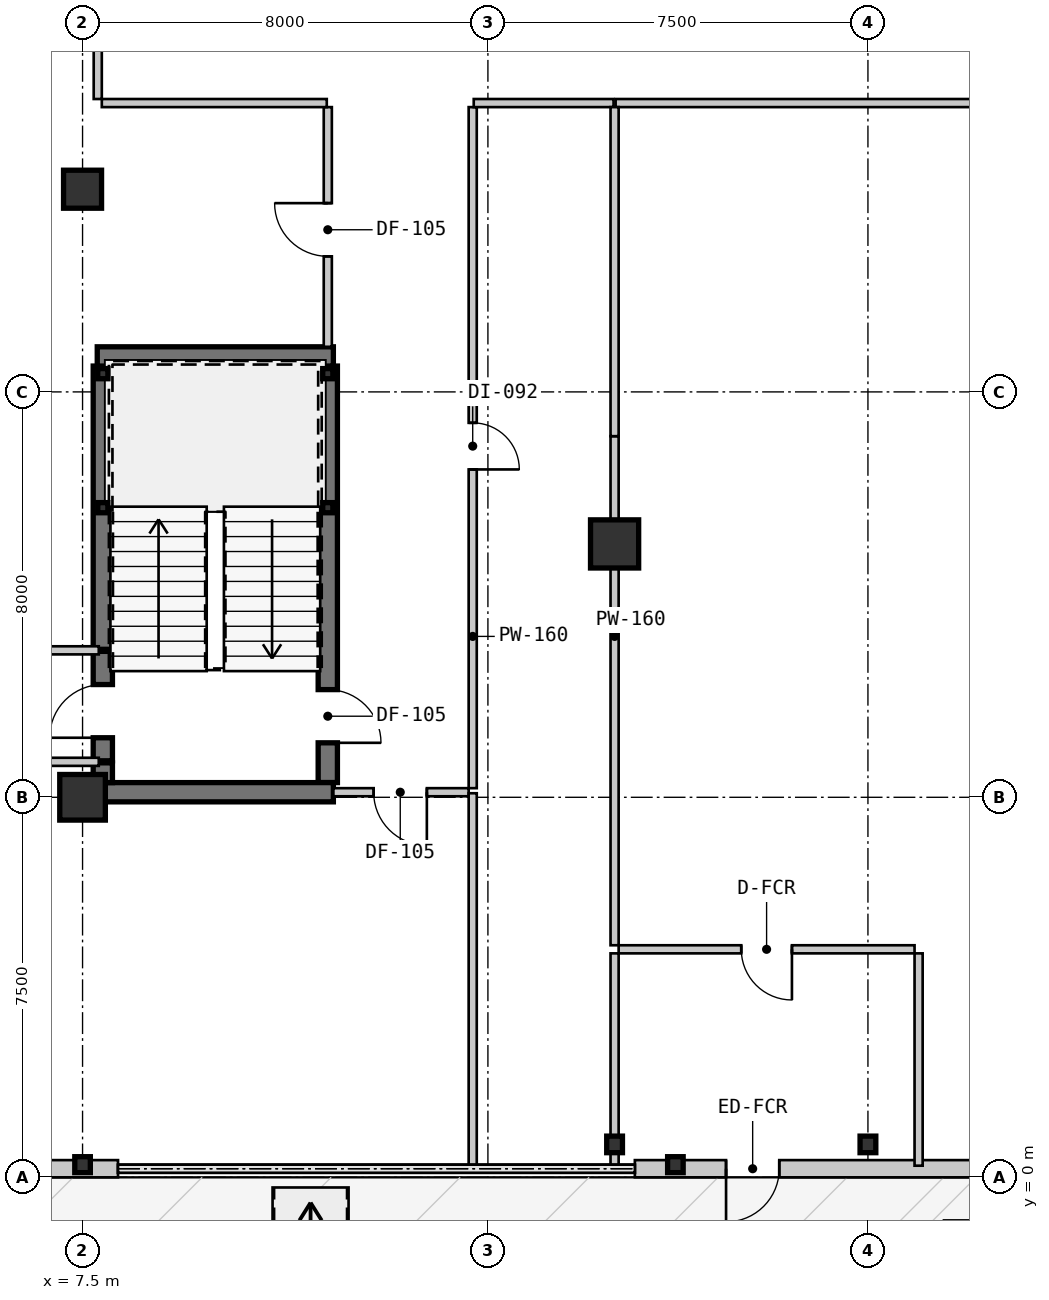
"""IFC4 building model, lengths in metres.
Left out: names, types, materials, properties, quantities, classifications, styles, units other than length and angle.
Written with IfcOpenShell. Run it as: python <this file> out.ifc"""

import sys

from ifc_helpers import new_model, si_unit, direction, frame, frame_2d, origin, origin_2d, place, context, subcontext, project, spatial, rectangle, hollow_rectangle, circle, i_section, extrude, source, transform, mapped, element, fill, save


model = new_model("IFC4")
c1 = context("Model", 3, precision=1e-05, world=origin(), true_north=direction((0.0, 1.0)))
c2 = subcontext(c1, "Body", "Model", "MODEL_VIEW")
j1 = project(units=[si_unit("LENGTHUNIT", "METRE"), si_unit("PLANEANGLEUNIT", "RADIAN")], contexts=[c1])
p1 = place(None, origin())
s1 = spatial("IfcSite", under=j1, at=p1, CompositionType="ELEMENT")
p2 = place(p1, origin())
s2 = spatial("IfcBuilding", under=s1, at=p2, CompositionType="ELEMENT")
p3 = place(p2, origin())
s3 = spatial("IfcBuildingStorey", under=s2, at=p3, CompositionType="ELEMENT", Elevation=0.0)
m1 = source(origin(), c2, "Body", "SweptSolid", [
    extrude(rectangle(XDim=0.95, YDim=0.95, at=origin_2d()), origin(), (0.0, 0.0, 1.0), 4.55),
])
p4 = place(p3, frame((18.0, 12.5, 0.0), z_axis=(0.0, 0.0, 1.0), x_axis=(1.0, 0.0, 0.0)))
e1 = element("IfcColumn", 1, at=p4, inside=s3, PredefinedType="COLUMN", context=c2, shape_type="MappedRepresentation", body=[
    mapped(m1, transform((0.0, 0.0, 0.0), scale=1.0)),
])
m2 = source(origin(), c2, "Body", "SweptSolid", [
    extrude(circle(Radius=0.45, at=origin_2d()), origin(), (0.0, 0.0, 1.0), 4.55),
])
p5 = place(p3, frame((7.5, 7.5, 0.0), z_axis=(0.0, 0.0, 1.0), x_axis=(1.0, 0.0, 0.0)))
e2 = element("IfcColumn", 2, at=p5, inside=s3, PredefinedType="COLUMN", context=c2, shape_type="MappedRepresentation", body=[
    mapped(m2, transform((0.0, 0.0, 0.0), scale=1.0)),
])
m3 = source(origin(), c2, "Body", "SweptSolid", [
    extrude(circle(Radius=0.375, at=origin_2d()), origin(), (0.0, 0.0, 1.0), 4.55),
])
p6 = place(p3, frame((7.5, 19.5, 0.0), z_axis=(0.0, 0.0, 1.0), x_axis=(1.0, 0.0, 0.0)))
e3 = element("IfcColumn", 3, at=p6, inside=s3, PredefinedType="COLUMN", context=c2, shape_type="MappedRepresentation", body=[
    mapped(m3, transform((0.0, 0.0, 0.0), scale=1.0)),
])
m4 = source(origin(), c2, "Body", "SweptSolid", [
    extrude(i_section(OverallWidth=0.311, OverallDepth=0.327, WebThickness=0.016, FlangeThickness=0.025, at=origin_2d()), origin(), (0.0, 0.0, 1.0), 4.55),
])
for number, where, z_axis, x_axis in (
    (4, (18.0, 0.65, 0.0), (0.0, 0.0, 1.0), (1.0, 0.0, 0.0)),
    (5, (23.0, 0.65, 0.0), (0.0, 0.0, 1.0), (1.0, 0.0, 0.0)),
):
    element("IfcColumn", number, at=place(p3, frame(where, z_axis=z_axis, x_axis=x_axis)), inside=s3, PredefinedType="COLUMN", context=c2, shape_type="MappedRepresentation", body=[
        mapped(m4, transform((0.0, 0.0, 0.0), scale=1.0)),
    ])
m5 = source(origin(), c2, "Body", "SweptSolid", [
    extrude(hollow_rectangle(XDim=0.2, YDim=0.2, WallThickness=0.009, at=origin_2d()), origin(), (0.0, 0.0, 1.0), 4.55),
])
for number, where, z_axis, x_axis in (
    (6, (7.9, 13.215, 0.0), (0.0, 0.0, 1.0), (1.0, 0.0, 0.0)),
    (7, (12.34, 13.215, 0.0), (0.0, 0.0, 1.0), (1.0, 0.0, 0.0)),
    (8, (7.9, 15.86, 0.0), (0.0, 0.0, 1.0), (1.0, 0.0, 0.0)),
    (9, (12.34, 15.86, 0.0), (0.0, 0.0, 1.0), (1.0, 0.0, 0.0)),
):
    element("IfcColumn", number, at=place(p3, frame(where, z_axis=z_axis, x_axis=x_axis)), inside=s3, PredefinedType="COLUMN", context=c2, shape_type="MappedRepresentation", body=[
        mapped(m5, transform((0.0, 0.0, 0.0), scale=1.0)),
    ])
m6 = source(origin(), c2, "Body", "SweptSolid", [
    extrude(i_section(OverallWidth=0.307, OverallDepth=0.315, WebThickness=0.012, FlangeThickness=0.019, at=origin_2d()), origin(), (0.0, 0.0, 1.0), 4.55),
])
for number, where, z_axis, x_axis in (
    (10, (7.5, 0.25, 0.0), (0.0, 0.0, 1.0), (1.0, 0.0, 0.0)),
    (11, (19.2, 0.25, 0.0), (0.0, 0.0, 1.0), (1.0, 0.0, 0.0)),
):
    element("IfcColumn", number, at=place(p3, frame(where, z_axis=z_axis, x_axis=x_axis)), inside=s3, PredefinedType="PILASTER", context=c2, shape_type="MappedRepresentation", body=[
        mapped(m6, transform((0.0, 0.0, 0.0), scale=1.0)),
    ])
m7 = source(origin(), c2, "Body", "SweptSolid", [
    extrude(rectangle(XDim=8.03, YDim=0.34, at=frame_2d((4.015, 0.0))), origin(), (0.0, 0.0, 1.0), 4.29),
])
p7 = place(p3, frame((0.17, 0.17, 0.0), z_axis=(0.0, 0.0, 1.0), x_axis=(1.0, 0.0, 0.0)))
e12 = element("IfcWall", 12, at=p7, inside=s3, PredefinedType="SOLIDWALL", context=c2, shape_type="MappedRepresentation", body=[
    mapped(m7, transform((0.0, 0.0, 0.0), scale=1.0)),
])
m8 = source(origin(), c2, "Body", "SweptSolid", [
    extrude(rectangle(XDim=1.8, YDim=2.3, at=frame_2d((0.9, 1.15))), frame((0.0, 0.18, 0.0), z_axis=(0.0, -1.0, 0.0), x_axis=(1.0, 0.0, 0.0)), (0.0, 0.0, 1.0), 0.36),
])
p8 = place(p7, frame((3.2, 0.0, 0.0)))
e13 = element("IfcOpeningElement", 13, at=p8, cuts=e12, PredefinedType="OPENING", context=c2, shape_type="MappedRepresentation", body=[
    mapped(m8, transform((0.0, 0.0, 0.0), scale=1.0)),
])
m9 = source(origin(), c2, "Body", "SweptSolid", [
    extrude(rectangle(XDim=8.8, YDim=0.34, at=frame_2d((4.4, 0.0))), origin(), (0.0, 0.0, 1.0), 4.29),
])
p9 = place(p3, frame((18.4, 0.17, 0.0), z_axis=(0.0, 0.0, 1.0), x_axis=(1.0, 0.0, 0.0)))
e14 = element("IfcWall", 14, at=p9, inside=s3, PredefinedType="SOLIDWALL", context=c2, shape_type="MappedRepresentation", body=[
    mapped(m9, transform((0.0, 0.0, 0.0), scale=1.0)),
])
m10 = source(origin(), c2, "Body", "SweptSolid", [
    extrude(rectangle(XDim=1.05, YDim=2.15, at=frame_2d((0.525, 1.075))), frame((0.0, 0.18, 0.0), z_axis=(0.0, -1.0, 0.0), x_axis=(1.0, 0.0, 0.0)), (0.0, 0.0, 1.0), 0.36),
])
p10 = place(p9, frame((1.8, 0.0, 0.0)))
e15 = element("IfcOpeningElement", 15, at=p10, cuts=e14, PredefinedType="OPENING", context=c2, shape_type="MappedRepresentation", body=[
    mapped(m10, transform((0.0, 0.0, 0.0), scale=1.0)),
])
m11 = source(origin(), c2, "Body", "SweptSolid", [
    extrude(rectangle(XDim=8.22, YDim=0.38, at=frame_2d((4.11, 0.0))), origin(), (0.0, 0.0, 1.0), 4.29),
])
p11 = place(p3, frame((12.34, 16.01, 0.0), z_axis=(0.0, 0.0, 1.0), x_axis=(0.0, -1.0, 0.0)))
e16 = element("IfcWall", 16, at=p11, inside=s3, PredefinedType="SHEAR", context=c2, shape_type="MappedRepresentation", body=[
    mapped(m11, transform((0.0, 0.0, 0.0), scale=1.0)),
])
m12 = source(origin(), c2, "Body", "SweptSolid", [
    extrude(rectangle(XDim=1.05, YDim=2.1, at=frame_2d((0.525, 1.05))), frame((0.0, 0.2, 0.0), z_axis=(0.0, -1.0, 0.0), x_axis=(1.0, 0.0, 0.0)), (0.0, 0.0, 1.0), 0.4),
])
p12 = place(p11, frame((6.385, 0.0, 0.0)))
e17 = element("IfcOpeningElement", 17, at=p12, cuts=e16, PredefinedType="OPENING", context=c2, shape_type="MappedRepresentation", body=[
    mapped(m12, transform((0.0, 0.0, 0.0), scale=1.0)),
])
m13 = source(origin(), c2, "Body", "SweptSolid", [
    extrude(rectangle(XDim=4.66, YDim=0.38, at=frame_2d((2.33, 0.0))), origin(), (0.0, 0.0, 1.0), 4.29),
])
p13 = place(p3, frame((12.45, 7.6, 0.0), z_axis=(0.0, 0.0, 1.0), x_axis=(-1.0, 0.0, 0.0)))
e18 = element("IfcWall", 18, at=p13, inside=s3, PredefinedType="SHEAR", context=c2, shape_type="MappedRepresentation", body=[
    mapped(m13, transform((0.0, 0.0, 0.0), scale=1.0)),
])
m14 = source(origin(), c2, "Body", "SweptSolid", [
    extrude(rectangle(XDim=0.39, YDim=0.38, at=frame_2d((0.195, 0.0))), origin(), (0.0, 0.0, 1.0), 4.29),
])
p14 = place(p3, frame((7.9, 7.79, 0.0), z_axis=(0.0, 0.0, 1.0), x_axis=(0.0, 1.0, 0.0)))
e19 = element("IfcWall", 19, at=p14, inside=s3, PredefinedType="SHEAR", context=c2, shape_type="MappedRepresentation", body=[
    mapped(m14, transform((0.0, 0.0, 0.0), scale=1.0)),
])
m15 = source(origin(), c2, "Body", "SweptSolid", [
    extrude(rectangle(XDim=5.59, YDim=0.38, at=frame_2d((2.795, 0.0))), origin(), (0.0, 0.0, 1.0), 4.29),
])
p15 = place(p3, frame((7.9, 10.42, 0.0), z_axis=(0.0, 0.0, 1.0), x_axis=(0.0, 1.0, 0.0)))
e20 = element("IfcWall", 20, at=p15, inside=s3, PredefinedType="SHEAR", context=c2, shape_type="MappedRepresentation", body=[
    mapped(m15, transform((0.0, 0.0, 0.0), scale=1.0)),
])
p16 = place(p3, frame((7.79, 16.2, 0.0), z_axis=(0.0, 0.0, 1.0), x_axis=(1.0, 0.0, 0.0)))
e21 = element("IfcWall", 21, at=p16, inside=s3, PredefinedType="SHEAR", context=c2, shape_type="MappedRepresentation", body=[
    mapped(m13, transform((0.0, 0.0, 0.0), scale=1.0)),
])
m16 = source(origin(), c2, "Body", "SweptSolid", [
    extrude(rectangle(XDim=2.16, YDim=0.38, at=frame_2d((1.08, 0.0))), origin(), (0.0, 0.0, 1.0), 4.29),
])
p17 = place(p3, frame((7.9, 8.22, 0.0), z_axis=(0.0, 0.0, 1.0), x_axis=(0.0, 1.0, 0.0)))
e22 = element("IfcWall", 22, at=p17, inside=s3, PredefinedType="SHEAR", context=c2, shape_type="MappedRepresentation", body=[
    mapped(m16, transform((0.0, 0.0, 0.0), scale=1.0)),
])
p18 = place(p17, frame((0.455, 0.0, 0.0)))
e23 = element("IfcOpeningElement", 23, at=p18, cuts=e22, PredefinedType="OPENING", context=c2, shape_type="MappedRepresentation", body=[
    mapped(m12, transform((0.0, 0.0, 0.0), scale=1.0)),
])
m17 = source(origin(), c2, "Body", "SweptSolid", [
    extrude(rectangle(XDim=23.959, YDim=0.16, at=frame_2d((11.98, 0.0))), origin(), (0.0, 0.0, 1.0), 4.29),
])
p19 = place(p3, frame((41.98, 21.2, 0.0), z_axis=(0.0, 0.0, 1.0), x_axis=(-1.0, 0.0, 0.0)))
e24 = element("IfcWall", 24, at=p19, inside=s3, PredefinedType="PARTITIONING", context=c2, shape_type="MappedRepresentation", body=[
    mapped(m17, transform((0.0, 0.0, 0.0), scale=1.0)),
])
m18 = source(origin(), c2, "Body", "SweptSolid", [
    extrude(rectangle(XDim=0.92, YDim=2.1, at=frame_2d((0.46, 1.05))), frame((0.0, 0.09, 0.0), z_axis=(0.0, -1.0, 0.0), x_axis=(1.0, 0.0, 0.0)), (0.0, 0.0, 1.0), 0.18),
])
p20 = place(p19, frame((11.52, 0.0, 0.0)))
e25 = element("IfcOpeningElement", 25, at=p20, cuts=e24, PredefinedType="OPENING", context=c2, shape_type="MappedRepresentation", body=[
    mapped(m18, transform((0.0, 0.0, 0.0), scale=1.0)),
])
m19 = source(origin(), c2, "Body", "SweptSolid", [
    extrude(rectangle(XDim=13.44, YDim=0.16, at=frame_2d((6.72, 0.0))), origin(), (0.0, 0.0, 1.0), 4.29),
])
p21 = place(p3, frame((15.2, 21.12, 0.0), z_axis=(0.0, 0.0, 1.0), x_axis=(0.0, -1.0, 0.0)))
e26 = element("IfcWall", 26, at=p21, inside=s3, PredefinedType="PARTITIONING", context=c2, shape_type="MappedRepresentation", body=[
    mapped(m19, transform((0.0, 0.0, 0.0), scale=1.0)),
])
p22 = place(p21, frame((6.23, 0.0, 0.0)))
e27 = element("IfcOpeningElement", 27, at=p22, cuts=e26, PredefinedType="OPENING", context=c2, shape_type="MappedRepresentation", body=[
    mapped(m18, transform((0.0, 0.0, 0.0), scale=1.0)),
])
m20 = source(origin(), c2, "Body", "SweptSolid", [
    extrude(rectangle(XDim=2.76, YDim=0.16, at=frame_2d((1.38, 0.0))), origin(), (0.0, 0.0, 1.0), 4.29),
])
p23 = place(p3, frame((17.98, 21.2, 0.0), z_axis=(0.0, 0.0, 1.0), x_axis=(-1.0, 0.0, 0.0)))
e28 = element("IfcWall", 28, at=p23, inside=s3, PredefinedType="PARTITIONING", context=c2, shape_type="MappedRepresentation", body=[
    mapped(m20, transform((0.0, 0.0, 0.0), scale=1.0)),
])
m21 = source(origin(), c2, "Body", "SweptSolid", [
    extrude(rectangle(XDim=2.67, YDim=0.16, at=frame_2d((1.335, 0.0))), origin(), (0.0, 0.0, 1.0), 4.29),
])
p24 = place(p3, frame((15.12, 7.6, 0.0), z_axis=(0.0, 0.0, 1.0), x_axis=(-1.0, 0.0, 0.0)))
e29 = element("IfcWall", 29, at=p24, inside=s3, PredefinedType="PARTITIONING", context=c2, shape_type="MappedRepresentation", body=[
    mapped(m21, transform((0.0, 0.0, 0.0), scale=1.0)),
])
m22 = source(origin(), c2, "Body", "SweptSolid", [
    extrude(rectangle(XDim=1.05, YDim=2.1, at=frame_2d((0.525, 1.05))), frame((0.0, 0.09, 0.0), z_axis=(0.0, -1.0, 0.0), x_axis=(1.0, 0.0, 0.0)), (0.0, 0.0, 1.0), 0.18),
])
p25 = place(p24, frame((0.825, 0.0, 0.0)))
e30 = element("IfcOpeningElement", 30, at=p25, cuts=e29, PredefinedType="OPENING", context=c2, shape_type="MappedRepresentation", body=[
    mapped(m22, transform((0.0, 0.0, 0.0), scale=1.0)),
])
m23 = source(origin(), c2, "Body", "SweptSolid", [
    extrude(rectangle(XDim=4.73, YDim=0.16, at=frame_2d((2.365, 0.0))), origin(), (0.0, 0.0, 1.0), 4.29),
])
p26 = place(p3, frame((12.34, 16.39, 0.0), z_axis=(0.0, 0.0, 1.0), x_axis=(0.0, 1.0, 0.0)))
e31 = element("IfcWall", 31, at=p26, inside=s3, PredefinedType="PARTITIONING", context=c2, shape_type="MappedRepresentation", body=[
    mapped(m23, transform((0.0, 0.0, 0.0), scale=1.0)),
])
p27 = place(p26, frame((1.785, 0.0, 0.0)))
e32 = element("IfcOpeningElement", 32, at=p27, cuts=e31, PredefinedType="OPENING", context=c2, shape_type="MappedRepresentation", body=[
    mapped(m22, transform((0.0, 0.0, 0.0), scale=1.0)),
])
m24 = source(origin(), c2, "Body", "SweptSolid", [
    extrude(rectangle(XDim=4.44, YDim=0.16, at=frame_2d((2.22, 0.0))), origin(), (0.0, 0.0, 1.0), 4.29),
])
p28 = place(p3, frame((12.32, 21.2, 0.0), z_axis=(0.0, 0.0, 1.0), x_axis=(-1.0, 0.0, 0.0)))
e33 = element("IfcWall", 33, at=p28, inside=s3, PredefinedType="PARTITIONING", context=c2, shape_type="MappedRepresentation", body=[
    mapped(m24, transform((0.0, 0.0, 0.0), scale=1.0)),
])
m25 = source(origin(), c2, "Body", "SweptSolid", [
    extrude(rectangle(XDim=2.64, YDim=0.16, at=frame_2d((1.32, 0.0))), origin(), (0.0, 0.0, 1.0), 4.29),
])
p29 = place(p3, frame((7.8, 21.28, 0.0), z_axis=(0.0, 0.0, 1.0), x_axis=(0.0, 1.0, 0.0)))
e34 = element("IfcWall", 34, at=p29, inside=s3, PredefinedType="PARTITIONING", context=c2, shape_type="MappedRepresentation", body=[
    mapped(m25, transform((0.0, 0.0, 0.0), scale=1.0)),
])
m26 = source(origin(), c2, "Body", "SweptSolid", [
    extrude(rectangle(XDim=5.84, YDim=0.16, at=frame_2d((2.92, 0.0))), origin(), (0.0, 0.0, 1.0), 4.29),
])
p30 = place(p3, frame((18.08, 4.5, 0.0), z_axis=(0.0, 0.0, 1.0), x_axis=(1.0, 0.0, 0.0)))
e35 = element("IfcWall", 35, at=p30, inside=s3, PredefinedType="PARTITIONING", context=c2, shape_type="MappedRepresentation", body=[
    mapped(m26, transform((0.0, 0.0, 0.0), scale=1.0)),
])
m27 = source(origin(), c2, "Body", "SweptSolid", [
    extrude(rectangle(XDim=1.0, YDim=2.1, at=frame_2d((0.5, 1.05))), frame((0.0, 0.09, 0.0), z_axis=(0.0, -1.0, 0.0), x_axis=(1.0, 0.0, 0.0)), (0.0, 0.0, 1.0), 0.18),
])
p31 = place(p30, frame((2.42, 0.0, 0.0)))
e36 = element("IfcOpeningElement", 36, at=p31, cuts=e35, PredefinedType="OPENING", context=c2, shape_type="MappedRepresentation", body=[
    mapped(m27, transform((0.0, 0.0, 0.0), scale=1.0)),
])
m28 = source(origin(), c2, "Body", "SweptSolid", [
    extrude(rectangle(XDim=4.19, YDim=0.16, at=frame_2d((2.095, 0.0))), origin(), (0.0, 0.0, 1.0), 4.29),
])
p32 = place(p3, frame((24.0, 4.42, 0.0), z_axis=(0.0, 0.0, 1.0), x_axis=(0.0, -1.0, 0.0)))
e37 = element("IfcWall", 37, at=p32, inside=s3, PredefinedType="PARTITIONING", context=c2, shape_type="MappedRepresentation", body=[
    mapped(m28, transform((0.0, 0.0, 0.0), scale=1.0)),
])
m29 = source(origin(), c2, "Body", "SweptSolid", [
    extrude(rectangle(XDim=0.42, YDim=0.16, at=frame_2d((0.21, 0.0))), origin(), (0.0, 0.0, 1.0), 4.29),
])
p33 = place(p3, frame((18.0, 0.23, 0.0), z_axis=(0.0, 0.0, 1.0), x_axis=(0.0, 1.0, 0.0)))
e38 = element("IfcWall", 38, at=p33, inside=s3, PredefinedType="PARTITIONING", context=c2, shape_type="MappedRepresentation", body=[
    mapped(m29, transform((0.0, 0.0, 0.0), scale=1.0)),
])
m30 = source(origin(), c2, "Body", "SweptSolid", [
    extrude(rectangle(XDim=3.77, YDim=0.16, at=frame_2d((1.885, 0.0))), origin(), (0.0, 0.0, 1.0), 3.757),
])
p34 = place(p3, frame((18.0, 0.65, 0.0), z_axis=(0.0, 0.0, 1.0), x_axis=(0.0, 1.0, 0.0)))
e39 = element("IfcWall", 39, at=p34, inside=s3, PredefinedType="PARTITIONING", context=c2, shape_type="MappedRepresentation", body=[
    mapped(m30, transform((0.0, 0.0, 0.0), scale=1.0)),
])
m31 = source(origin(), c2, "Body", "SweptSolid", [
    extrude(rectangle(XDim=10.046, YDim=0.16, at=frame_2d((5.023, 0.0))), origin(), (0.0, 0.0, 1.0), 3.757),
])
p35 = place(p3, frame((18.0, 4.58, 0.0), z_axis=(0.0, 0.0, 1.0), x_axis=(0.0, 1.0, 0.0)))
e40 = element("IfcWall", 40, at=p35, inside=s3, PredefinedType="PARTITIONING", context=c2, shape_type="MappedRepresentation", body=[
    mapped(m31, transform((0.0, 0.0, 0.0), scale=1.0)),
])
m32 = source(origin(), c2, "Body", "SweptSolid", [
    extrude(rectangle(XDim=6.494, YDim=0.16, at=frame_2d((3.247, 0.0))), origin(), (0.0, 0.0, 1.0), 4.29),
])
p36 = place(p3, frame((18.0, 14.626, 0.0), z_axis=(0.0, 0.0, 1.0), x_axis=(0.0, 1.0, 0.0)))
e41 = element("IfcWall", 41, at=p36, inside=s3, PredefinedType="PARTITIONING", context=c2, shape_type="MappedRepresentation", body=[
    mapped(m32, transform((0.0, 0.0, 0.0), scale=1.0)),
])
m33 = source(origin(), c2, "Body", "SweptSolid", [
    extrude(rectangle(XDim=7.35, YDim=0.16, at=frame_2d((3.675, 0.0))), origin(), (0.0, 0.0, 1.0), 4.29),
])
p37 = place(p3, frame((15.2, 0.23, 0.0), z_axis=(0.0, 0.0, 1.0), x_axis=(0.0, 1.0, 0.0)))
e42 = element("IfcWall", 42, at=p37, inside=s3, PredefinedType="PARTITIONING", context=c2, shape_type="MappedRepresentation", body=[
    mapped(m33, transform((0.0, 0.0, 0.0), scale=1.0)),
])
m34 = source(origin(), c2, "Body", "SweptSolid", [
    extrude(rectangle(XDim=7.59, YDim=0.16, at=frame_2d((3.795, 0.0))), origin(), (0.0, 0.0, 1.0), 4.29),
])
for number, where, z_axis, x_axis in (
    (43, (0.23, 8.2, 0.0), (0.0, 0.0, 1.0), (1.0, 0.0, 0.0)),
    (44, (7.82, 10.4, 0.0), (0.0, 0.0, 1.0), (-1.0, 0.0, 0.0)),
):
    element("IfcWall", number, at=place(p3, frame(where, z_axis=z_axis, x_axis=x_axis)), inside=s3, PredefinedType="PARTITIONING", context=c2, shape_type="MappedRepresentation", body=[
        mapped(m34, transform((0.0, 0.0, 0.0), scale=1.0)),
    ])
m35 = source(origin(), c2, "Body", "SweptSolid", [
    extrude(rectangle(XDim=1.05, YDim=2.15, at=frame_2d((0.525, 1.075))), frame((0.0, 0.025, 0.0), z_axis=(0.0, -1.0, 0.0), x_axis=(1.0, 0.0, 0.0)), (0.0, 0.0, 1.0), 0.05),
])
p38 = place(p10, frame((1.05, 0.0, 0.0), z_axis=(0.0, 0.0, 1.0), x_axis=(-1.0, 0.0, 0.0)))
e45 = element("IfcDoor", 45, at=p38, inside=s3, OperationType="SINGLE_SWING_RIGHT", PredefinedType="DOOR", context=c2, shape_type="MappedRepresentation", body=[
    mapped(m35, transform((0.0, 0.0, 0.0), scale=1.0)),
])
fill(e15, e45)
p39 = place(p3, frame((0.0, 0.0, 3.72)))
p40 = place(p39, frame((25.5, -1.45, 0.13)))
e46 = element("IfcWindow", 46, at=p40, inside=s3, PartitioningType="SINGLE_PANEL", PredefinedType="SKYLIGHT", context=c2, shape_type="SweptSolid", body=[
    extrude(rectangle(XDim=2.0, YDim=1.2, at=origin_2d()), origin(), (0.0, 0.0, 1.0), 0.05),
])
m36 = source(origin(), c2, "Body", "SweptSolid", [
    extrude(rectangle(XDim=1.05, YDim=2.1, at=frame_2d((0.525, 1.05))), frame((0.0, 0.025, 0.0), z_axis=(0.0, -1.0, 0.0), x_axis=(1.0, 0.0, 0.0)), (0.0, 0.0, 1.0), 0.05),
])
p41 = place(p12, origin())
e47 = element("IfcDoor", 47, at=p41, inside=s3, OperationType="SINGLE_SWING_RIGHT", PredefinedType="DOOR", context=c2, shape_type="MappedRepresentation", body=[
    mapped(m36, transform((0.0, 0.0, 0.0), scale=1.0)),
])
fill(e17, e47)
m37 = source(origin(), c2, "Body", "SweptSolid", [
    extrude(rectangle(XDim=0.92, YDim=2.1, at=frame_2d((0.46, 1.05))), frame((0.0, 0.025, 0.0), z_axis=(0.0, -1.0, 0.0), x_axis=(1.0, 0.0, 0.0)), (0.0, 0.0, 1.0), 0.05),
])
p42 = place(p22, origin())
e48 = element("IfcDoor", 48, at=p42, inside=s3, OperationType="SINGLE_SWING_RIGHT", PredefinedType="DOOR", context=c2, shape_type="MappedRepresentation", body=[
    mapped(m37, transform((0.0, 0.0, 0.0), scale=1.0)),
])
fill(e27, e48)
p43 = place(p25, origin())
e49 = element("IfcDoor", 49, at=p43, inside=s3, OperationType="SINGLE_SWING_LEFT", PredefinedType="DOOR", context=c2, shape_type="MappedRepresentation", body=[
    mapped(m36, transform((0.0, 0.0, 0.0), scale=1.0)),
])
fill(e30, e49)
p44 = place(p27, origin())
e50 = element("IfcDoor", 50, at=p44, inside=s3, OperationType="SINGLE_SWING_RIGHT", PredefinedType="DOOR", context=c2, shape_type="MappedRepresentation", body=[
    mapped(m36, transform((0.0, 0.0, 0.0), scale=1.0)),
])
fill(e32, e50)
m38 = source(origin(), c2, "Body", "SweptSolid", [
    extrude(rectangle(XDim=1.0, YDim=2.1, at=frame_2d((0.5, 1.05))), frame((0.0, 0.025, 0.0), z_axis=(0.0, -1.0, 0.0), x_axis=(1.0, 0.0, 0.0)), (0.0, 0.0, 1.0), 0.05),
])
p45 = place(p31, frame((1.0, 0.0, 0.0), z_axis=(0.0, 0.0, 1.0), x_axis=(-1.0, 0.0, 0.0)))
e51 = element("IfcDoor", 51, at=p45, inside=s3, OperationType="SINGLE_SWING_LEFT", PredefinedType="DOOR", context=c2, shape_type="MappedRepresentation", body=[
    mapped(m38, transform((0.0, 0.0, 0.0), scale=1.0)),
])
fill(e36, e51)
p46 = place(p18, origin())
e52 = element("IfcDoor", 52, at=p46, inside=s3, OperationType="SINGLE_SWING_LEFT", PredefinedType="DOOR", context=c2, shape_type="MappedRepresentation", body=[
    mapped(m36, transform((0.0, 0.0, 0.0), scale=1.0)),
])
fill(e23, e52)
save(model, sys.argv[1])
